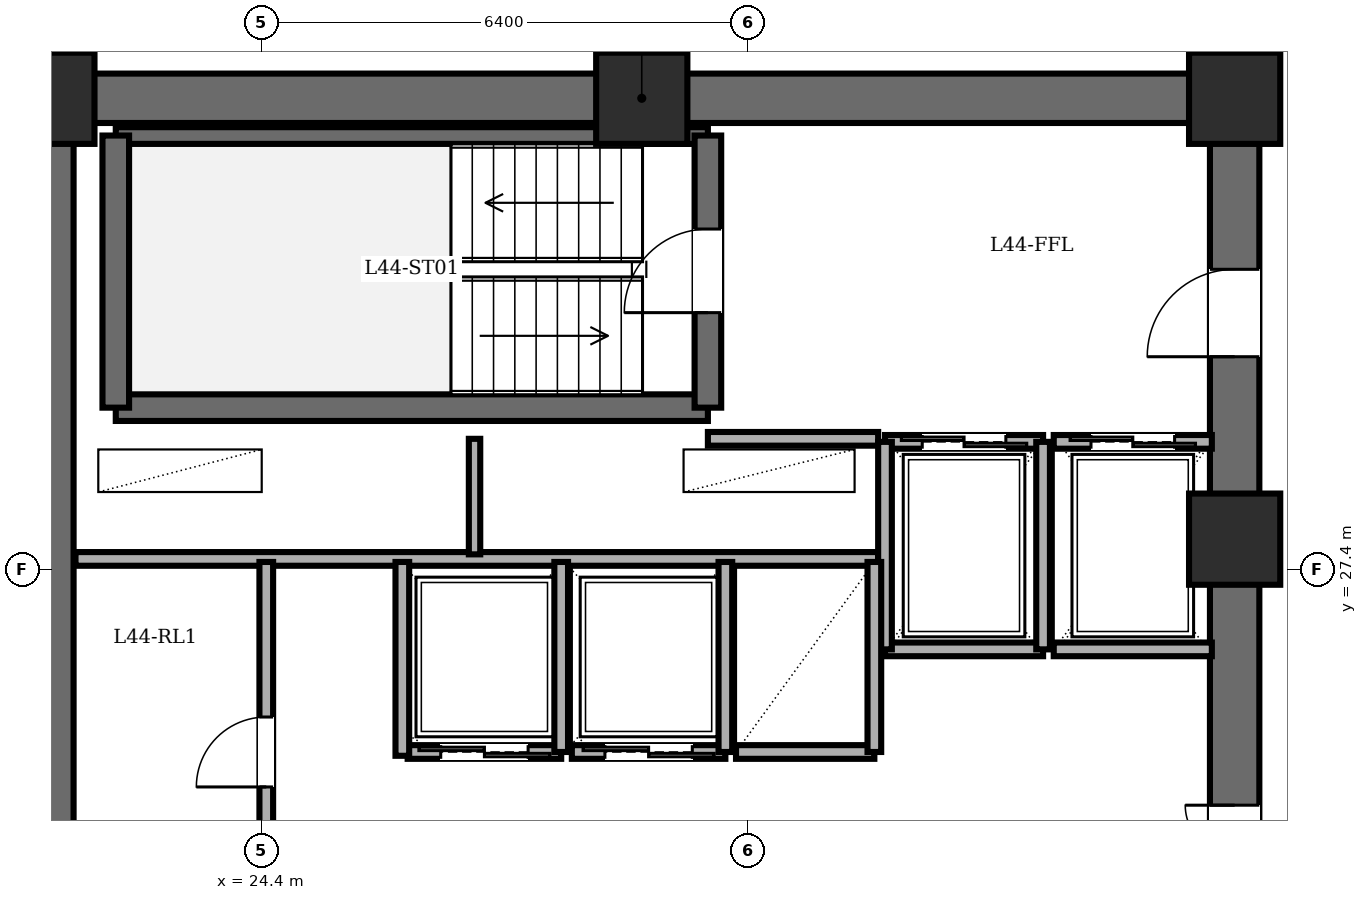
"""IFC4 building model, lengths in metres.
Left out: names, types, materials, properties, quantities, classifications, styles, units other than length and angle.
Written with IfcOpenShell. Run it as: python <this file> out.ifc"""

import sys

from ifc_helpers import new_model, si_unit, direction, frame, frame_2d, origin, origin_2d, place, context, subcontext, project, spatial, rectangle, extrude, element, fill, save


model = new_model("IFC4")
c1 = context("Model", 3, precision=1e-05, world=origin(), true_north=direction((0.0, 1.0)))
c2 = subcontext(c1, "Body", "Model", "MODEL_VIEW")
j1 = project(units=[si_unit("LENGTHUNIT", "METRE"), si_unit("PLANEANGLEUNIT", "RADIAN")], contexts=[c1])
p1 = place(None, origin())
s1 = spatial("IfcSite", under=j1, at=p1, CompositionType="ELEMENT")
p2 = place(p1, origin())
s2 = spatial("IfcBuilding", under=s1, at=p2, CompositionType="ELEMENT")
p3 = place(p2, frame((0.0, 0.0, 169.0)))
s3 = spatial("IfcBuildingStorey", under=s2, at=p3, CompositionType="ELEMENT", Elevation=169.0)
for number, where, z_axis, x_axis in (
    (1, (37.2, 27.8, 0.0), (0.0, 0.0, 1.0), (1.0, 0.0, 0.0)),
    (2, (37.2, 33.6, 0.0), (0.0, 0.0, 1.0), (1.0, 0.0, 0.0)),
    (3, (29.4, 33.6, 0.0), (0.0, 0.0, 1.0), (1.0, 0.0, 0.0)),
    (4, (21.6, 33.6, 0.0), (0.0, 0.0, 1.0), (1.0, 0.0, 0.0)),
):
    element("IfcColumn", number, at=place(p3, frame(where, z_axis=z_axis, x_axis=x_axis)), inside=s3, PredefinedType="COLUMN", context=c2, shape_type="SweptSolid", body=[
        extrude(rectangle(XDim=1.2, YDim=1.2, at=origin_2d()), origin(), (0.0, 0.0, 1.0), 3.6),
    ])
p4 = place(p3, frame((21.6, 14.4, 0.0), z_axis=(0.0, 0.0, 1.0), x_axis=(0.0, 1.0, 0.0)))
e5 = element("IfcWall", 5, at=p4, inside=s3, PredefinedType="SHEAR", context=c2, shape_type="SweptSolid", body=[
    extrude(rectangle(XDim=19.2, YDim=0.65, at=frame_2d((9.6, 0.0))), origin(), (0.0, 0.0, 1.0), 3.4),
])
p5 = place(p3, frame((21.6, 33.6, 0.0), z_axis=(0.0, 0.0, 1.0), x_axis=(1.0, 0.0, 0.0)))
e6 = element("IfcWall", 6, at=p5, inside=s3, PredefinedType="SHEAR", context=c2, shape_type="SweptSolid", body=[
    extrude(rectangle(XDim=15.6, YDim=0.65, at=frame_2d((7.8, 0.0))), origin(), (0.0, 0.0, 1.0), 3.4),
])
p6 = place(p3, frame((37.2, 14.4, 0.0), z_axis=(0.0, 0.0, 1.0), x_axis=(0.0, 1.0, 0.0)))
e7 = element("IfcWall", 7, at=p6, inside=s3, PredefinedType="SHEAR", context=c2, shape_type="SweptSolid", body=[
    extrude(rectangle(XDim=19.2, YDim=0.65, at=frame_2d((9.6, 0.0))), origin(), (0.0, 0.0, 1.0), 3.4),
])
p7 = place(p6, frame((15.8, 0.0, 0.0)))
e8 = element("IfcOpeningElement", 8, at=p7, cuts=e7, PredefinedType="OPENING", context=c2, shape_type="SweptSolid", body=[
    extrude(rectangle(XDim=1.15, YDim=2.15, at=frame_2d((0.575, 1.075))), frame((0.0, 0.335, 0.0), z_axis=(0.0, -1.0, 0.0), x_axis=(1.0, 0.0, 0.0)), (0.0, 0.0, 1.0), 0.67),
])
p8 = place(p6, frame((3.6, 0.0, 0.0)))
e9 = element("IfcOpeningElement", 9, at=p8, cuts=e7, PredefinedType="OPENING", context=c2, shape_type="SweptSolid", body=[
    extrude(rectangle(XDim=1.1, YDim=2.15, at=frame_2d((0.55, 1.075))), frame((0.0, 0.335, 0.0), z_axis=(0.0, -1.0, 0.0), x_axis=(1.0, 0.0, 0.0)), (0.0, 0.0, 1.0), 0.67),
])
p9 = place(p6, frame((8.6, 0.0, 0.0)))
e10 = element("IfcOpeningElement", 10, at=p9, cuts=e7, PredefinedType="OPENING", context=c2, shape_type="SweptSolid", body=[
    extrude(rectangle(XDim=1.3, YDim=2.2, at=frame_2d((0.65, 1.1))), frame((0.0, 0.335, 0.0), z_axis=(0.0, -1.0, 0.0), x_axis=(1.0, 0.0, 0.0)), (0.0, 0.0, 1.0), 0.67),
])
p10 = place(p3, frame((22.48, 29.53, 0.0), z_axis=(0.0, 0.0, 1.0), x_axis=(1.0, 0.0, 0.0)))
e11 = element("IfcWall", 11, at=p10, inside=s3, PredefinedType="SOLIDWALL", context=c2, shape_type="SweptSolid", body=[
    extrude(rectangle(XDim=7.79, YDim=0.35, at=frame_2d((3.895, 0.0))), origin(), (0.0, 0.0, 1.0), 3.4),
])
p11 = place(p3, frame((22.48, 33.11, 0.0), z_axis=(0.0, 0.0, 1.0), x_axis=(1.0, 0.0, 0.0)))
e12 = element("IfcWall", 12, at=p11, inside=s3, PredefinedType="PARTITIONING", context=c2, shape_type="SweptSolid", body=[
    extrude(rectangle(XDim=7.79, YDim=0.22, at=frame_2d((3.895, 0.0))), origin(), (0.0, 0.0, 1.0), 3.4),
])
p12 = place(p3, frame((22.48, 29.53, 0.0), z_axis=(0.0, 0.0, 1.0), x_axis=(0.0, 1.0, 0.0)))
e13 = element("IfcWall", 13, at=p12, inside=s3, PredefinedType="SOLIDWALL", context=c2, shape_type="SweptSolid", body=[
    extrude(rectangle(XDim=3.58, YDim=0.35, at=frame_2d((1.79, 0.0))), origin(), (0.0, 0.0, 1.0), 3.4),
])
p13 = place(p3, frame((30.27, 29.53, 0.0), z_axis=(0.0, 0.0, 1.0), x_axis=(0.0, 1.0, 0.0)))
e14 = element("IfcWall", 14, at=p13, inside=s3, PredefinedType="SOLIDWALL", context=c2, shape_type="SweptSolid", body=[
    extrude(rectangle(XDim=3.58, YDim=0.35, at=frame_2d((1.79, 0.0))), origin(), (0.0, 0.0, 1.0), 3.4),
])
p14 = place(p13, frame((1.25, 0.0, 0.0)))
e15 = element("IfcOpeningElement", 15, at=p14, cuts=e14, PredefinedType="OPENING", context=c2, shape_type="SweptSolid", body=[
    extrude(rectangle(XDim=1.1, YDim=2.15, at=frame_2d((0.55, 1.075))), frame((0.0, 0.185, 0.0), z_axis=(0.0, -1.0, 0.0), x_axis=(1.0, 0.0, 0.0)), (0.0, 0.0, 1.0), 0.37),
])
p15 = place(p3, frame((30.27, 29.12, 0.0), z_axis=(0.0, 0.0, 1.0), x_axis=(1.0, 0.0, 0.0)))
e16 = element("IfcWall", 16, at=p15, inside=s3, PredefinedType="PARTITIONING", context=c2, shape_type="SweptSolid", body=[
    extrude(rectangle(XDim=2.24, YDim=0.18, at=frame_2d((1.12, 0.0))), origin(), (0.0, 0.0, 1.0), 3.4),
])
p16 = place(p3, frame((21.95, 27.54, 0.0), z_axis=(0.0, 0.0, 1.0), x_axis=(1.0, 0.0, 0.0)))
e17 = element("IfcWall", 17, at=p16, inside=s3, PredefinedType="PARTITIONING", context=c2, shape_type="SweptSolid", body=[
    extrude(rectangle(XDim=10.56, YDim=0.18, at=frame_2d((5.28, 0.0))), origin(), (0.0, 0.0, 1.0), 3.4),
])
p17 = place(p3, frame((27.2, 27.6, 0.0), z_axis=(0.0, 0.0, 1.0), x_axis=(0.0, 1.0, 0.0)))
e18 = element("IfcWall", 18, at=p17, inside=s3, PredefinedType="PARTITIONING", context=c2, shape_type="SweptSolid", body=[
    extrude(rectangle(XDim=1.52, YDim=0.15, at=frame_2d((0.76, 0.0))), origin(), (0.0, 0.0, 1.0), 3.4),
])
p18 = place(p3, frame((32.6, 29.08, 0.0), z_axis=(0.0, 0.0, 1.0), x_axis=(1.0, 0.0, 0.0)))
e19 = element("IfcWall", 19, at=p18, inside=s3, PredefinedType="PARTITIONING", context=c2, shape_type="SweptSolid", body=[
    extrude(rectangle(XDim=2.08, YDim=0.18, at=frame_2d((1.04, 0.0))), origin(), (0.0, 0.0, 1.0), 3.4),
])
p19 = place(p18, frame((0.49, 0.0, 0.0)))
e20 = element("IfcOpeningElement", 20, at=p19, cuts=e19, PredefinedType="OPENING", context=c2, shape_type="SweptSolid", body=[
    extrude(rectangle(XDim=1.1, YDim=2.2, at=frame_2d((0.55, 1.1))), frame((0.0, 0.1, 0.0), z_axis=(0.0, -1.0, 0.0), x_axis=(1.0, 0.0, 0.0)), (0.0, 0.0, 1.0), 0.2),
])
p20 = place(p3, frame((34.68, 26.35, 0.0), z_axis=(0.0, 0.0, 1.0), x_axis=(-1.0, 0.0, 0.0)))
e21 = element("IfcWall", 21, at=p20, inside=s3, PredefinedType="PARTITIONING", context=c2, shape_type="SweptSolid", body=[
    extrude(rectangle(XDim=2.08, YDim=0.18, at=frame_2d((1.04, 0.0))), origin(), (0.0, 0.0, 1.0), 3.4),
])
for number, where, z_axis, x_axis in (
    (22, (34.68, 26.35, 0.0), (0.0, 0.0, 1.0), (0.0, 1.0, 0.0)),
    (23, (32.6, 29.08, 0.0), (0.0, 0.0, 1.0), (0.0, -1.0, 0.0)),
):
    element("IfcWall", number, at=place(p3, frame(where, z_axis=z_axis, x_axis=x_axis)), inside=s3, PredefinedType="PARTITIONING", context=c2, shape_type="SweptSolid", body=[
        extrude(rectangle(XDim=2.73, YDim=0.18, at=frame_2d((1.365, 0.0))), origin(), (0.0, 0.0, 1.0), 3.4),
    ])
p21 = place(p3, frame((34.82, 29.08, 0.0), z_axis=(0.0, 0.0, 1.0), x_axis=(1.0, 0.0, 0.0)))
e24 = element("IfcWall", 24, at=p21, inside=s3, PredefinedType="PARTITIONING", context=c2, shape_type="SweptSolid", body=[
    extrude(rectangle(XDim=2.08, YDim=0.18, at=frame_2d((1.04, 0.0))), origin(), (0.0, 0.0, 1.0), 3.4),
])
p22 = place(p21, frame((0.49, 0.0, 0.0)))
e25 = element("IfcOpeningElement", 25, at=p22, cuts=e24, PredefinedType="OPENING", context=c2, shape_type="SweptSolid", body=[
    extrude(rectangle(XDim=1.1, YDim=2.2, at=frame_2d((0.55, 1.1))), frame((0.0, 0.1, 0.0), z_axis=(0.0, -1.0, 0.0), x_axis=(1.0, 0.0, 0.0)), (0.0, 0.0, 1.0), 0.2),
])
p23 = place(p3, frame((36.9, 26.35, 0.0), z_axis=(0.0, 0.0, 1.0), x_axis=(-1.0, 0.0, 0.0)))
e26 = element("IfcWall", 26, at=p23, inside=s3, PredefinedType="PARTITIONING", context=c2, shape_type="SweptSolid", body=[
    extrude(rectangle(XDim=2.08, YDim=0.18, at=frame_2d((1.04, 0.0))), origin(), (0.0, 0.0, 1.0), 3.4),
])
p24 = place(p3, frame((28.34, 25.0, 0.0), z_axis=(0.0, 0.0, 1.0), x_axis=(-1.0, 0.0, 0.0)))
e27 = element("IfcWall", 27, at=p24, inside=s3, PredefinedType="PARTITIONING", context=c2, shape_type="SweptSolid", body=[
    extrude(rectangle(XDim=2.02, YDim=0.18, at=frame_2d((1.01, 0.0))), origin(), (0.0, 0.0, 1.0), 3.4),
])
p25 = place(p24, frame((0.435, 0.0, 0.0)))
e28 = element("IfcOpeningElement", 28, at=p25, cuts=e27, PredefinedType="OPENING", context=c2, shape_type="SweptSolid", body=[
    extrude(rectangle(XDim=1.15, YDim=2.2, at=frame_2d((0.575, 1.1))), frame((0.0, 0.1, 0.0), z_axis=(0.0, -1.0, 0.0), x_axis=(1.0, 0.0, 0.0)), (0.0, 0.0, 1.0), 0.2),
])
p26 = place(p3, frame((28.34, 25.0, 0.0), z_axis=(0.0, 0.0, 1.0), x_axis=(0.0, 1.0, 0.0)))
e29 = element("IfcWall", 29, at=p26, inside=s3, PredefinedType="PARTITIONING", context=c2, shape_type="SweptSolid", body=[
    extrude(rectangle(XDim=2.5, YDim=0.18, at=frame_2d((1.25, 0.0))), origin(), (0.0, 0.0, 1.0), 3.4),
])
p27 = place(p3, frame((30.5, 25.0, 0.0), z_axis=(0.0, 0.0, 1.0), x_axis=(-1.0, 0.0, 0.0)))
e30 = element("IfcWall", 30, at=p27, inside=s3, PredefinedType="PARTITIONING", context=c2, shape_type="SweptSolid", body=[
    extrude(rectangle(XDim=2.02, YDim=0.18, at=frame_2d((1.01, 0.0))), origin(), (0.0, 0.0, 1.0), 3.4),
])
p28 = place(p27, frame((0.435, 0.0, 0.0)))
e31 = element("IfcOpeningElement", 31, at=p28, cuts=e30, PredefinedType="OPENING", context=c2, shape_type="SweptSolid", body=[
    extrude(rectangle(XDim=1.15, YDim=2.2, at=frame_2d((0.575, 1.1))), frame((0.0, 0.1, 0.0), z_axis=(0.0, -1.0, 0.0), x_axis=(1.0, 0.0, 0.0)), (0.0, 0.0, 1.0), 0.2),
])
p29 = place(p3, frame((30.5, 25.0, 0.0), z_axis=(0.0, 0.0, 1.0), x_axis=(0.0, 1.0, 0.0)))
e32 = element("IfcWall", 32, at=p29, inside=s3, PredefinedType="PARTITIONING", context=c2, shape_type="SweptSolid", body=[
    extrude(rectangle(XDim=2.5, YDim=0.18, at=frame_2d((1.25, 0.0))), origin(), (0.0, 0.0, 1.0), 3.4),
])
p30 = place(p3, frame((32.46, 25.0, 0.0), z_axis=(0.0, 0.0, 1.0), x_axis=(-1.0, 0.0, 0.0)))
e33 = element("IfcWall", 33, at=p30, inside=s3, PredefinedType="PARTITIONING", context=c2, shape_type="SweptSolid", body=[
    extrude(rectangle(XDim=1.82, YDim=0.18, at=frame_2d((0.91, 0.0))), origin(), (0.0, 0.0, 1.0), 3.4),
])
p31 = place(p3, frame((32.46, 25.0, 0.0), z_axis=(0.0, 0.0, 1.0), x_axis=(0.0, 1.0, 0.0)))
e34 = element("IfcWall", 34, at=p31, inside=s3, PredefinedType="PARTITIONING", context=c2, shape_type="SweptSolid", body=[
    extrude(rectangle(XDim=2.5, YDim=0.18, at=frame_2d((1.25, 0.0))), origin(), (0.0, 0.0, 1.0), 3.4),
])
p32 = place(p3, frame((24.46, 22.5, 0.0), z_axis=(0.0, 0.0, 1.0), x_axis=(0.0, 1.0, 0.0)))
e35 = element("IfcWall", 35, at=p32, inside=s3, PredefinedType="PARTITIONING", context=c2, shape_type="SweptSolid", body=[
    extrude(rectangle(XDim=5.0, YDim=0.18, at=frame_2d((2.5, 0.0))), origin(), (0.0, 0.0, 1.0), 3.4),
])
p33 = place(p32, frame((2.04, 0.0, 0.0)))
e36 = element("IfcOpeningElement", 36, at=p33, cuts=e35, PredefinedType="OPENING", context=c2, shape_type="SweptSolid", body=[
    extrude(rectangle(XDim=0.92, YDim=2.1, at=frame_2d((0.46, 1.05))), frame((0.0, 0.1, 0.0), z_axis=(0.0, -1.0, 0.0), x_axis=(1.0, 0.0, 0.0)), (0.0, 0.0, 1.0), 0.2),
])
p34 = place(p3, frame((26.25, 24.95, 0.0), z_axis=(0.0, 0.0, 1.0), x_axis=(0.0, 1.0, 0.0)))
e37 = element("IfcWall", 37, at=p34, inside=s3, PredefinedType="PARTITIONING", context=c2, shape_type="SweptSolid", body=[
    extrude(rectangle(XDim=2.55, YDim=0.18, at=frame_2d((1.275, 0.0))), origin(), (0.0, 0.0, 1.0), 3.4),
])
p35 = place(p14, origin())
e38 = element("IfcDoor", 38, at=p35, inside=s3, OperationType="SINGLE_SWING_LEFT", PredefinedType="DOOR", context=c2, shape_type="SweptSolid", body=[
    extrude(rectangle(XDim=1.1, YDim=2.15, at=frame_2d((0.55, 1.075))), frame((0.0, 0.025, 0.0), z_axis=(0.0, -1.0, 0.0), x_axis=(1.0, 0.0, 0.0)), (0.0, 0.0, 1.0), 0.05),
])
fill(e15, e38)
p36 = place(p7, origin())
e39 = element("IfcDoor", 39, at=p36, inside=s3, OperationType="SINGLE_SWING_LEFT", PredefinedType="DOOR", context=c2, shape_type="SweptSolid", body=[
    extrude(rectangle(XDim=1.15, YDim=2.15, at=frame_2d((0.575, 1.075))), frame((0.0, 0.025, 0.0), z_axis=(0.0, -1.0, 0.0), x_axis=(1.0, 0.0, 0.0)), (0.0, 0.0, 1.0), 0.05),
])
fill(e8, e39)
p37 = place(p19, origin())
e40 = element("IfcDoor", 40, at=p37, inside=s3, OperationType="DOUBLE_DOOR_SLIDING", PredefinedType="DOOR", context=c2, shape_type="SweptSolid", body=[
    extrude(rectangle(XDim=1.1, YDim=2.2, at=frame_2d((0.55, 1.1))), frame((0.0, 0.025, 0.0), z_axis=(0.0, -1.0, 0.0), x_axis=(1.0, 0.0, 0.0)), (0.0, 0.0, 1.0), 0.05),
])
fill(e20, e40)
p38 = place(p22, origin())
e41 = element("IfcDoor", 41, at=p38, inside=s3, OperationType="DOUBLE_DOOR_SLIDING", PredefinedType="DOOR", context=c2, shape_type="SweptSolid", body=[
    extrude(rectangle(XDim=1.1, YDim=2.2, at=frame_2d((0.55, 1.1))), frame((0.0, 0.025, 0.0), z_axis=(0.0, -1.0, 0.0), x_axis=(1.0, 0.0, 0.0)), (0.0, 0.0, 1.0), 0.05),
])
fill(e25, e41)
p39 = place(p25, origin())
e42 = element("IfcDoor", 42, at=p39, inside=s3, OperationType="DOUBLE_DOOR_SLIDING", PredefinedType="DOOR", context=c2, shape_type="SweptSolid", body=[
    extrude(rectangle(XDim=1.15, YDim=2.2, at=frame_2d((0.575, 1.1))), frame((0.0, 0.025, 0.0), z_axis=(0.0, -1.0, 0.0), x_axis=(1.0, 0.0, 0.0)), (0.0, 0.0, 1.0), 0.05),
])
fill(e28, e42)
p40 = place(p28, origin())
e43 = element("IfcDoor", 43, at=p40, inside=s3, OperationType="DOUBLE_DOOR_SLIDING", PredefinedType="DOOR", context=c2, shape_type="SweptSolid", body=[
    extrude(rectangle(XDim=1.15, YDim=2.2, at=frame_2d((0.575, 1.1))), frame((0.0, 0.025, 0.0), z_axis=(0.0, -1.0, 0.0), x_axis=(1.0, 0.0, 0.0)), (0.0, 0.0, 1.0), 0.05),
])
fill(e31, e43)
p41 = place(p33, origin())
e44 = element("IfcDoor", 44, at=p41, inside=s3, OperationType="SINGLE_SWING_LEFT", PredefinedType="DOOR", context=c2, shape_type="SweptSolid", body=[
    extrude(rectangle(XDim=0.92, YDim=2.1, at=frame_2d((0.46, 1.05))), frame((0.0, 0.025, 0.0), z_axis=(0.0, -1.0, 0.0), x_axis=(1.0, 0.0, 0.0)), (0.0, 0.0, 1.0), 0.05),
])
fill(e36, e44)
p42 = place(p9, origin())
e45 = element("IfcDoor", 45, at=p42, inside=s3, OperationType="DOUBLE_DOOR_SINGLE_SWING", PredefinedType="DOOR", context=c2, shape_type="SweptSolid", body=[
    extrude(rectangle(XDim=1.3, YDim=2.2, at=frame_2d((0.65, 1.1))), frame((0.0, 0.025, 0.0), z_axis=(0.0, -1.0, 0.0), x_axis=(1.0, 0.0, 0.0)), (0.0, 0.0, 1.0), 0.05),
])
fill(e10, e45)
save(model, sys.argv[1])
